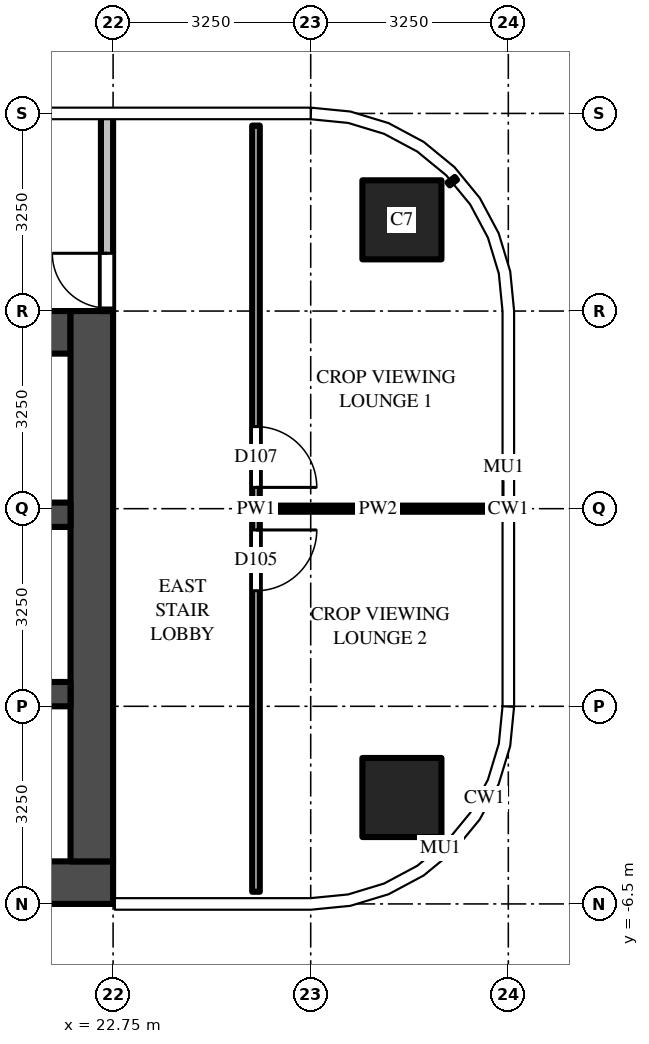
"""IFC4 building model, lengths in metres.
Left out: names, types, materials, properties, quantities, classifications, styles, units other than length and angle.
Written with IfcOpenShell. Run it as: python <this file> out.ifc"""

import sys

from ifc_helpers import new_model, si_unit, direction, frame, frame_2d, origin, origin_2d, place, context, subcontext, project, spatial, rectangle, extrude, source, transform, mapped, element, fill, save


model = new_model("IFC4")
c1 = context("Model", 3, precision=1e-05, world=origin(), true_north=direction((0.0, 1.0)))
c2 = subcontext(c1, "Body", "Model", "MODEL_VIEW")
j1 = project(units=[si_unit("LENGTHUNIT", "METRE"), si_unit("PLANEANGLEUNIT", "RADIAN")], contexts=[c1])
p1 = place(None, origin())
s1 = spatial("IfcSite", under=j1, at=p1, CompositionType="ELEMENT")
p2 = place(p1, origin())
s2 = spatial("IfcBuilding", under=s1, at=p2, CompositionType="ELEMENT")
p3 = place(p2, frame((0.0, 0.0, 151.5)))
s3 = spatial("IfcBuildingStorey", under=s2, at=p3, CompositionType="ELEMENT", Elevation=151.5)
m1 = source(origin(), c2, "Body", "SweptSolid", [
    extrude(rectangle(XDim=1.3, YDim=1.3, at=origin_2d()), origin(), (0.0, 0.0, 1.0), 4.5),
])
for number, where, z_axis, x_axis in (
    (1, (27.5, 4.75, 0.0), (0.0, 0.0, 1.0), (1.0, 0.0, 0.0)),
    (2, (27.5, -4.75, 0.0), (0.0, 0.0, 1.0), (1.0, 0.0, 0.0)),
):
    element("IfcColumn", number, at=place(p3, frame(where, z_axis=z_axis, x_axis=x_axis)), inside=s3, PredefinedType="COLUMN", context=c2, shape_type="MappedRepresentation", body=[
        mapped(m1, transform((0.0, 0.0, 0.0))),
    ])
m2 = source(origin(), c2, "Body", "SweptSolid", [
    extrude(rectangle(XDim=16.5, YDim=0.7, at=frame_2d((8.25, 0.0))), origin(), (0.0, 0.0, 1.0), 4.15),
])
p4 = place(p3, frame((6.25, -6.15, 0.0), z_axis=(0.0, 0.0, 1.0), x_axis=(1.0, 0.0, 0.0)))
e3 = element("IfcWall", 3, at=p4, inside=s3, PredefinedType="SHEAR", context=c2, shape_type="MappedRepresentation", body=[
    mapped(m2, transform((0.0, 0.0, 0.0))),
])
m3 = source(origin(), c2, "Body", "SweptSolid", [
    extrude(rectangle(XDim=14.85, YDim=0.7, at=frame_2d((7.425, 0.0))), origin(), (0.0, 0.0, 1.0), 4.15),
])
p5 = place(p3, frame((7.2, 2.9, 0.0), z_axis=(0.0, 0.0, 1.0), x_axis=(1.0, 0.0, 0.0)))
e4 = element("IfcWall", 4, at=p5, inside=s3, PredefinedType="SHEAR", context=c2, shape_type="MappedRepresentation", body=[
    mapped(m3, transform((0.0, 0.0, 0.0))),
])
m4 = source(origin(), c2, "Body", "SweptSolid", [
    extrude(rectangle(XDim=1.3, YDim=2.1, at=frame_2d((0.65, 1.05))), frame((0.0, 0.36, 0.0), z_axis=(0.0, -1.0, 0.0), x_axis=(1.0, 0.0, 0.0)), (0.0, 0.0, 1.0), 0.72),
])
p6 = place(p5, frame((12.2, 0.0, 0.0)))
e5 = element("IfcOpeningElement", 5, at=p6, cuts=e4, PredefinedType="OPENING", context=c2, shape_type="MappedRepresentation", body=[
    mapped(m4, transform((0.0, 0.0, 0.0))),
])
m5 = source(origin(), c2, "Body", "SweptSolid", [
    extrude(rectangle(XDim=1.2, YDim=2.1, at=frame_2d((0.6, 1.05))), frame((0.0, 0.36, 0.0), z_axis=(0.0, -1.0, 0.0), x_axis=(1.0, 0.0, 0.0)), (0.0, 0.0, 1.0), 0.72),
])
p7 = place(p5, frame((9.85, 0.0, 0.0)))
e6 = element("IfcOpeningElement", 6, at=p7, cuts=e4, PredefinedType="OPENING", context=c2, shape_type="MappedRepresentation", body=[
    mapped(m5, transform((0.0, 0.0, 0.0))),
])
m6 = source(origin(), c2, "Body", "SweptSolid", [
    extrude(rectangle(XDim=1.0, YDim=2.1, at=frame_2d((0.5, 1.05))), frame((0.0, 0.36, 0.0), z_axis=(0.0, -1.0, 0.0), x_axis=(1.0, 0.0, 0.0)), (0.0, 0.0, 1.0), 0.72),
])
p8 = place(p5, frame((7.9, 0.0, 0.0)))
e7 = element("IfcOpeningElement", 7, at=p8, cuts=e4, PredefinedType="OPENING", context=c2, shape_type="MappedRepresentation", body=[
    mapped(m6, transform((0.0, 0.0, 0.0))),
])
m7 = source(origin(), c2, "Body", "SweptSolid", [
    extrude(rectangle(XDim=0.9, YDim=2.1, at=frame_2d((0.45, 1.05))), frame((0.0, 0.36, 0.0), z_axis=(0.0, -1.0, 0.0), x_axis=(1.0, 0.0, 0.0)), (0.0, 0.0, 1.0), 0.72),
])
p9 = place(p5, frame((0.65, 0.0, 0.0)))
e8 = element("IfcOpeningElement", 8, at=p9, cuts=e4, PredefinedType="OPENING", context=c2, shape_type="MappedRepresentation", body=[
    mapped(m7, transform((0.0, 0.0, 0.0))),
])
p10 = place(p5, frame((3.25, 0.0, 0.0)))
e9 = element("IfcOpeningElement", 9, at=p10, cuts=e4, PredefinedType="OPENING", context=c2, shape_type="MappedRepresentation", body=[
    mapped(m7, transform((0.0, 0.0, 0.0))),
])
p11 = place(p5, frame((5.85, 0.0, 0.0)))
e10 = element("IfcOpeningElement", 10, at=p11, cuts=e4, PredefinedType="OPENING", context=c2, shape_type="MappedRepresentation", body=[
    mapped(m7, transform((0.0, 0.0, 0.0))),
])
m8 = source(origin(), c2, "Body", "SweptSolid", [
    extrude(rectangle(XDim=9.05, YDim=0.7, at=frame_2d((4.525, 0.0))), origin(), (0.0, 0.0, 1.0), 4.15),
])
p12 = place(p3, frame((22.4, -5.8, 0.0), z_axis=(0.0, 0.0, 1.0), x_axis=(0.0, 1.0, 0.0)))
e11 = element("IfcWall", 11, at=p12, inside=s3, PredefinedType="SHEAR", context=c2, shape_type="MappedRepresentation", body=[
    mapped(m8, transform((0.0, 0.0, 0.0))),
])
m9 = source(origin(), c2, "Body", "SweptSolid", [
    extrude(rectangle(XDim=14.85, YDim=0.4, at=frame_2d((7.425, 0.0))), origin(), (0.0, 0.0, 1.0), 4.15),
])
p13 = place(p3, frame((7.2, -0.1, 0.0), z_axis=(0.0, 0.0, 1.0), x_axis=(1.0, 0.0, 0.0)))
e12 = element("IfcWall", 12, at=p13, inside=s3, PredefinedType="SHEAR", context=c2, shape_type="MappedRepresentation", body=[
    mapped(m9, transform((0.0, 0.0, 0.0))),
])
m10 = source(origin(), c2, "Body", "SweptSolid", [
    extrude(rectangle(XDim=1.0, YDim=2.1, at=frame_2d((0.5, 1.05))), frame((0.0, 0.21, 0.0), z_axis=(0.0, -1.0, 0.0), x_axis=(1.0, 0.0, 0.0)), (0.0, 0.0, 1.0), 0.42),
])
p14 = place(p13, frame((7.9, 0.0, 0.0)))
e13 = element("IfcOpeningElement", 13, at=p14, cuts=e12, PredefinedType="OPENING", context=c2, shape_type="MappedRepresentation", body=[
    mapped(m10, transform((0.0, 0.0, 0.0))),
])
m11 = source(origin(), c2, "Body", "SweptSolid", [
    extrude(rectangle(XDim=5.7, YDim=0.4, at=frame_2d((2.85, 0.0))), origin(), (0.0, 0.0, 1.0), 4.15),
])
p15 = place(p3, frame((16.35, -3.05, 0.0), z_axis=(0.0, 0.0, 1.0), x_axis=(1.0, 0.0, 0.0)))
e14 = element("IfcWall", 14, at=p15, inside=s3, PredefinedType="SHEAR", context=c2, shape_type="MappedRepresentation", body=[
    mapped(m11, transform((0.0, 0.0, 0.0))),
])
m12 = source(origin(), c2, "Body", "SweptSolid", [
    extrude(rectangle(XDim=3.25, YDim=0.2, at=frame_2d((1.625, 0.0))), origin(), (0.0, 0.0, 1.0), 4.15),
])
p16 = place(p3, frame((22.65, 3.25, 0.0), z_axis=(0.0, 0.0, 1.0), x_axis=(0.0, 1.0, 0.0)))
e15 = element("IfcWall", 15, at=p16, inside=s3, PredefinedType="PARTITIONING", context=c2, shape_type="MappedRepresentation", body=[
    mapped(m12, transform((0.0, 0.0, 0.0))),
])
m13 = source(origin(), c2, "Body", "SweptSolid", [
    extrude(rectangle(XDim=0.9, YDim=2.1, at=frame_2d((0.45, 1.05))), frame((0.0, 0.11, 0.0), z_axis=(0.0, -1.0, 0.0), x_axis=(1.0, 0.0, 0.0)), (0.0, 0.0, 1.0), 0.22),
])
p17 = place(p16, frame((0.05, 0.0, 0.0)))
e16 = element("IfcOpeningElement", 16, at=p17, cuts=e15, PredefinedType="OPENING", context=c2, shape_type="MappedRepresentation", body=[
    mapped(m13, transform((0.0, 0.0, 0.0))),
])
p18 = place(p3, frame((25.1, 6.3, 0.0), z_axis=(0.0, 0.0, 1.0), x_axis=(0.0, -1.0, 0.0)))
e17 = element("IfcWall", 17, at=p18, inside=s3, PredefinedType="PARTITIONING", context=c2, shape_type="SweptSolid", body=[
    extrude(rectangle(XDim=12.6, YDim=0.125, at=frame_2d((6.3, 0.0))), origin(), (0.0, 0.0, 1.0), 3.23),
])
m14 = source(origin(), c2, "Body", "SweptSolid", [
    extrude(rectangle(XDim=1.0, YDim=2.1, at=frame_2d((0.5, 1.05))), frame((0.0, 0.073, 0.0), z_axis=(0.0, -1.0, 0.0), x_axis=(1.0, 0.0, 0.0)), (0.0, 0.0, 1.0), 0.145),
])
p19 = place(p18, frame((6.65, 0.0, 0.0)))
e18 = element("IfcOpeningElement", 18, at=p19, cuts=e17, PredefinedType="OPENING", context=c2, shape_type="MappedRepresentation", body=[
    mapped(m14, transform((0.0, 0.0, 0.0))),
])
p20 = place(p18, frame((4.95, 0.0, 0.0)))
e19 = element("IfcOpeningElement", 19, at=p20, cuts=e17, PredefinedType="OPENING", context=c2, shape_type="MappedRepresentation", body=[
    mapped(m14, transform((0.0, 0.0, 0.0))),
])
p21 = place(p3, frame((25.163, 0.0, 0.0), z_axis=(0.0, 0.0, 1.0), x_axis=(1.0, 0.0, 0.0)))
e20 = element("IfcWall", 20, at=p21, inside=s3, PredefinedType="PARTITIONING", context=c2, shape_type="SweptSolid", body=[
    extrude(rectangle(XDim=3.887, YDim=0.1, at=frame_2d((1.944, 0.0))), origin(), (0.0, 0.0, 1.0), 3.23),
])
m15 = source(origin(), c2, "Body", "SweptSolid", [
    extrude(rectangle(XDim=0.9, YDim=2.1, at=frame_2d((0.45, 1.05))), frame((0.0, 0.025, 0.0), z_axis=(0.0, -1.0, 0.0), x_axis=(1.0, 0.0, 0.0)), (0.0, 0.0, 1.0), 0.05),
])
p22 = place(p17, origin())
e21 = element("IfcDoor", 21, at=p22, inside=s3, OperationType="SINGLE_SWING_RIGHT", PredefinedType="DOOR", context=c2, shape_type="MappedRepresentation", body=[
    mapped(m15, transform((0.0, 0.0, 0.0))),
])
fill(e16, e21)
m16 = source(origin(), c2, "Body", "SweptSolid", [
    extrude(rectangle(XDim=1.0, YDim=2.1, at=frame_2d((0.5, 1.05))), frame((0.0, 0.025, 0.0), z_axis=(0.0, -1.0, 0.0), x_axis=(1.0, 0.0, 0.0)), (0.0, 0.0, 1.0), 0.05),
])
p23 = place(p19, origin())
e22 = element("IfcDoor", 22, at=p23, inside=s3, OperationType="SINGLE_SWING_LEFT", PredefinedType="DOOR", context=c2, shape_type="MappedRepresentation", body=[
    mapped(m16, transform((0.0, 0.0, 0.0))),
])
fill(e18, e22)
p24 = place(p20, origin())
e23 = element("IfcDoor", 23, at=p24, inside=s3, OperationType="SINGLE_SWING_RIGHT", PredefinedType="DOOR", context=c2, shape_type="MappedRepresentation", body=[
    mapped(m16, transform((0.0, 0.0, 0.0))),
])
fill(e19, e23)
save(model, sys.argv[1])
